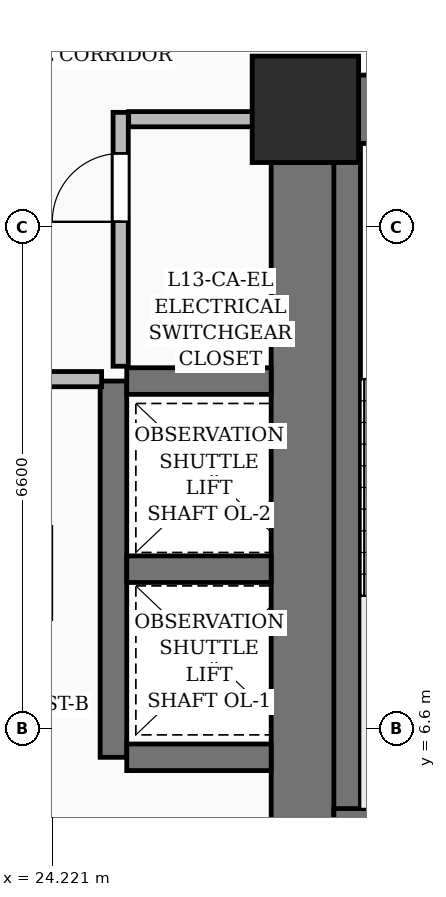
"""IFC4 building model, lengths in metres.
Left out: names, types, materials, properties, quantities, classifications, styles, units other than length and angle.
Written with IfcOpenShell. Run it as: python <this file> out.ifc"""

import sys

from ifc_helpers import new_model, si_unit, direction, frame, frame_2d, origin, origin_2d, place, context, subcontext, project, spatial, rectangle, extrude, element, fill, save


model = new_model("IFC4")
c1 = context("Model", 3, precision=1e-05, world=origin(), true_north=direction((0.0, 1.0)))
c2 = subcontext(c1, "Body", "Model", "MODEL_VIEW")
j1 = project(units=[si_unit("LENGTHUNIT", "METRE"), si_unit("PLANEANGLEUNIT", "RADIAN")], contexts=[c1])
p1 = place(None, origin())
s1 = spatial("IfcSite", under=j1, at=p1, CompositionType="ELEMENT")
p2 = place(p1, origin())
s2 = spatial("IfcBuilding", under=s1, at=p2, CompositionType="ELEMENT")
p3 = place(p2, frame((0.0, 0.0, 57.0)))
s3 = spatial("IfcBuildingStorey", under=s2, at=p3, CompositionType="ELEMENT", Elevation=57.0)
p4 = place(p3, frame((27.55, 14.75, 0.0), z_axis=(0.0, 0.0, 1.0), x_axis=(1.0, 0.0, 0.0)))
e1 = element("IfcColumn", 1, at=p4, inside=s3, PredefinedType="COLUMN", context=c2, shape_type="SweptSolid", body=[
    extrude(rectangle(XDim=1.4, YDim=1.4, at=origin_2d()), origin(), (0.0, 0.0, 1.0), 3.6),
])
p5 = place(p3, frame((28.25, 14.75, 0.0), z_axis=(0.0, 0.0, 1.0), x_axis=(1.0, 0.0, 0.0)))
e2 = element("IfcWall", 2, at=p5, inside=s3, PredefinedType="SHEAR", context=c2, shape_type="SweptSolid", body=[
    extrude(rectangle(XDim=6.2, YDim=0.9, at=frame_2d((3.1, 0.0))), origin(), (0.0, 0.0, 1.0), 3.6),
])
p6 = place(p5, frame((0.925, 0.0, 0.0)))
e3 = element("IfcOpeningElement", 3, at=p6, cuts=e2, PredefinedType="OPENING", context=c2, shape_type="SweptSolid", body=[
    extrude(rectangle(XDim=1.05, YDim=2.15, at=frame_2d((0.525, 1.075))), frame((0.0, 0.46, 0.0), z_axis=(0.0, -1.0, 0.0), x_axis=(1.0, 0.0, 0.0)), (0.0, 0.0, 1.0), 0.92),
])
p7 = place(p3, frame((27.55, 5.25, 0.0), z_axis=(0.0, 0.0, 1.0), x_axis=(0.0, 1.0, 0.0)))
e4 = element("IfcWall", 4, at=p7, inside=s3, PredefinedType="SHEAR", context=c2, shape_type="SweptSolid", body=[
    extrude(rectangle(XDim=8.8, YDim=0.9, at=frame_2d((4.4, 0.0))), origin(), (0.0, 0.0, 1.0), 3.6),
])
p8 = place(p3, frame((28.1, 5.2, 0.0), z_axis=(0.0, 0.0, 1.0), x_axis=(0.0, 1.0, 0.0)))
e5 = element("IfcWall", 5, at=p8, inside=s3, PredefinedType="SOLIDWALL", context=c2, shape_type="SweptSolid", body=[
    extrude(rectangle(XDim=9.1, YDim=0.35, at=frame_2d((4.55, 0.0))), origin(), (0.0, 0.0, 1.0), 3.6),
])
p9 = place(p3, frame((27.925, 5.375, 0.0), z_axis=(0.0, 0.0, 1.0), x_axis=(1.0, 0.0, 0.0)))
e6 = element("IfcWall", 6, at=p9, inside=s3, PredefinedType="SOLIDWALL", context=c2, shape_type="SweptSolid", body=[
    extrude(rectangle(XDim=3.55, YDim=0.35, at=frame_2d((1.775, 0.0))), origin(), (0.0, 0.0, 1.0), 3.6),
])
p10 = place(p3, frame((25.025, 6.225, 0.0), z_axis=(0.0, 0.0, 1.0), x_axis=(0.0, 1.0, 0.0)))
e7 = element("IfcWall", 7, at=p10, inside=s3, PredefinedType="SOLIDWALL", context=c2, shape_type="SweptSolid", body=[
    extrude(rectangle(XDim=4.95, YDim=0.35, at=frame_2d((2.475, 0.0))), origin(), (0.0, 0.0, 1.0), 3.6),
])
for number, where, z_axis, x_axis in (
    (8, (25.2, 6.225, 0.0), (0.0, 0.0, 1.0), (1.0, 0.0, 0.0)),
    (9, (25.2, 8.7, 0.0), (0.0, 0.0, 1.0), (1.0, 0.0, 0.0)),
    (10, (25.2, 11.175, 0.0), (0.0, 0.0, 1.0), (1.0, 0.0, 0.0)),
):
    element("IfcWall", number, at=place(p3, frame(where, z_axis=z_axis, x_axis=x_axis)), inside=s3, PredefinedType="SOLIDWALL", context=c2, shape_type="SweptSolid", body=[
        extrude(rectangle(XDim=1.9, YDim=0.35, at=frame_2d((0.95, 0.0))), origin(), (0.0, 0.0, 1.0), 3.6),
    ])
p11 = place(p3, frame((25.12, 11.37, 0.0), z_axis=(0.0, 0.0, 1.0), x_axis=(0.0, 1.0, 0.0)))
e11 = element("IfcWall", 11, at=p11, inside=s3, PredefinedType="PARTITIONING", context=c2, shape_type="SweptSolid", body=[
    extrude(rectangle(XDim=3.34, YDim=0.2, at=frame_2d((1.67, 0.0))), origin(), (0.0, 0.0, 1.0), 3.35),
])
p12 = place(p11, frame((1.9, 0.0, 0.0)))
e12 = element("IfcOpeningElement", 12, at=p12, cuts=e11, PredefinedType="OPENING", context=c2, shape_type="SweptSolid", body=[
    extrude(rectangle(XDim=0.9, YDim=2.1, at=frame_2d((0.45, 1.05))), frame((0.0, 0.11, 0.0), z_axis=(0.0, -1.0, 0.0), x_axis=(1.0, 0.0, 0.0)), (0.0, 0.0, 1.0), 0.22),
])
p13 = place(p3, frame((25.225, 14.62, 0.0), z_axis=(0.0, 0.0, 1.0), x_axis=(1.0, 0.0, 0.0)))
e13 = element("IfcWall", 13, at=p13, inside=s3, PredefinedType="PARTITIONING", context=c2, shape_type="SweptSolid", body=[
    extrude(rectangle(XDim=1.86, YDim=0.2, at=frame_2d((0.93, 0.0))), origin(), (0.0, 0.0, 1.0), 3.35),
])
p14 = place(p3, frame((21.485, 11.2, 0.0), z_axis=(0.0, 0.0, 1.0), x_axis=(1.0, 0.0, 0.0)))
e14 = element("IfcWall", 14, at=p14, inside=s3, PredefinedType="PARTITIONING", context=c2, shape_type="SweptSolid", body=[
    extrude(rectangle(XDim=3.384, YDim=0.2, at=frame_2d((1.692, 0.0))), origin(), (0.0, 0.0, 1.0), 2.709),
])
p15 = place(p14, frame((0.89, 0.0, 0.0)))
e15 = element("IfcOpeningElement", 15, at=p15, cuts=e14, PredefinedType="OPENING", context=c2, shape_type="SweptSolid", body=[
    extrude(rectangle(XDim=1.6, YDim=2.3, at=frame_2d((0.8, 1.15))), frame((0.0, 0.11, 0.0), z_axis=(0.0, -1.0, 0.0), x_axis=(1.0, 0.0, 0.0)), (0.0, 0.0, 1.0), 0.22),
])
p16 = place(p12, origin())
e16 = element("IfcDoor", 16, at=p16, inside=s3, OperationType="SINGLE_SWING_LEFT", PredefinedType="DOOR", context=c2, shape_type="SweptSolid", body=[
    extrude(rectangle(XDim=0.9, YDim=2.1, at=frame_2d((0.45, 1.05))), frame((0.0, 0.025, 0.0), z_axis=(0.0, -1.0, 0.0), x_axis=(1.0, 0.0, 0.0)), (0.0, 0.0, 1.0), 0.05),
])
fill(e12, e16)
save(model, sys.argv[1])
